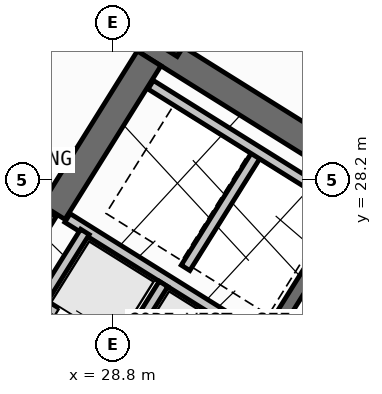
"""IFC4 building model, lengths in metres.
Left out: names, types, materials, properties, quantities, classifications, styles, units other than length and angle.
Written with IfcOpenShell. Run it as: python <this file> out.ifc"""

import sys

from ifc_helpers import new_model, si_unit, direction, frame, frame_2d, origin, origin_2d, place, context, subcontext, project, spatial, rectangle, hollow_rectangle, extrude, source, transform, mapped, element, fill, save


model = new_model("IFC4")
c1 = context("Model", 3, precision=1e-05, world=origin(), true_north=direction((0.0, 1.0)))
c2 = subcontext(c1, "Body", "Model", "MODEL_VIEW")
j1 = project(units=[si_unit("LENGTHUNIT", "METRE"), si_unit("PLANEANGLEUNIT", "RADIAN")], contexts=[c1])
p1 = place(None, origin())
s1 = spatial("IfcSite", under=j1, at=p1, CompositionType="ELEMENT")
p2 = place(p1, origin())
s2 = spatial("IfcBuilding", under=s1, at=p2, CompositionType="ELEMENT")
p3 = place(p2, frame((0.0, 0.0, 112.5)))
s3 = spatial("IfcBuildingStorey", under=s2, at=p3, CompositionType="ELEMENT", Elevation=112.5)
p4 = place(p3, frame((40.573, 24.01, 0.0), z_axis=(0.0, 0.0, 1.0), x_axis=(-0.848047359947, 0.529920442413, 0.0)))
e1 = element("IfcWall", 1, at=p4, inside=s3, PredefinedType="SHEAR", context=c2, shape_type="SweptSolid", body=[
    extrude(rectangle(XDim=13.14, YDim=0.55, at=frame_2d((6.57, 0.0))), origin(), (0.0, 0.0, 1.0), 3.35),
])
p5 = place(p3, frame((29.517, 30.594, 0.0), z_axis=(0.0, 0.0, 1.0), x_axis=(-0.529906864564, -0.848055844204, 0.0)))
e2 = element("IfcWall", 2, at=p5, inside=s3, PredefinedType="SHEAR", context=c2, shape_type="SweptSolid", body=[
    extrude(rectangle(XDim=3.575, YDim=0.55, at=frame_2d((1.788, 0.0))), origin(), (0.0, 0.0, 1.0), 3.35),
])
m1 = source(origin(), c2, "Body", "SweptSolid", [
    extrude(hollow_rectangle(XDim=0.9, YDim=0.9, WallThickness=0.036, at=origin_2d()), origin(), (0.0, 0.0, 1.0), 3.6),
])
p6 = place(p3, frame((29.928, 31.251, 0.0), z_axis=(0.0, 0.0, 1.0), x_axis=(-0.848048096156, 0.529919264233, 0.0)))
e3 = element("IfcColumn", 3, at=p6, inside=s3, PredefinedType="COLUMN", context=c2, shape_type="MappedRepresentation", body=[
    mapped(m1, transform((0.0, 0.0, 0.0), scale=1.0)),
])
p7 = place(p3, frame((31.76, 12.183, 0.0), z_axis=(0.0, 0.0, 1.0), x_axis=(-0.848047074256, 0.529920899612, 0.0)))
e4 = element("IfcWall", 4, at=p7, inside=s3, PredefinedType="STANDARD", context=c2, shape_type="SweptSolid", body=[
    extrude(rectangle(XDim=30.652, YDim=0.32, at=frame_2d((15.326, 0.0))), origin(), (0.0, 0.0, 1.0), 3.35),
])
p8 = place(p7, frame((15.153, 0.0, 0.0)))
e5 = element("IfcOpeningElement", 5, at=p8, cuts=e4, PredefinedType="OPENING", context=c2, shape_type="SweptSolid", body=[
    extrude(rectangle(XDim=1.2, YDim=2.15, at=frame_2d((0.6, 1.075))), frame((0.0, 0.17, 0.0), z_axis=(0.0, -1.0, 0.0), x_axis=(1.0, 0.0, 0.0)), (0.0, 0.0, 1.0), 0.34),
])
p9 = place(p7, frame((2.002, 0.0, 0.8)))
e6 = element("IfcOpeningElement", 6, at=p9, cuts=e4, PredefinedType="OPENING", context=c2, shape_type="SweptSolid", body=[
    extrude(rectangle(XDim=2.1, YDim=1.55, at=frame_2d((1.05, 0.775))), frame((0.0, 0.17, 0.0), z_axis=(0.0, -1.0, 0.0), x_axis=(1.0, 0.0, 0.0)), (0.0, 0.0, 1.0), 0.34),
])
p10 = place(p7, frame((7.206, 0.0, 0.8)))
e7 = element("IfcOpeningElement", 7, at=p10, cuts=e4, PredefinedType="OPENING", context=c2, shape_type="SweptSolid", body=[
    extrude(rectangle(XDim=2.1, YDim=1.55, at=frame_2d((1.05, 0.775))), frame((0.0, 0.17, 0.0), z_axis=(0.0, -1.0, 0.0), x_axis=(1.0, 0.0, 0.0)), (0.0, 0.0, 1.0), 0.34),
])
p11 = place(p7, frame((12.648, 0.0, 1.0)))
e8 = element("IfcOpeningElement", 8, at=p11, cuts=e4, PredefinedType="OPENING", context=c2, shape_type="SweptSolid", body=[
    extrude(rectangle(XDim=0.9, YDim=1.25, at=frame_2d((0.45, 0.625))), frame((0.0, 0.17, 0.0), z_axis=(0.0, -1.0, 0.0), x_axis=(1.0, 0.0, 0.0)), (0.0, 0.0, 1.0), 0.34),
])
p12 = place(p7, frame((19.59, 0.0, 0.95)))
e9 = element("IfcOpeningElement", 9, at=p12, cuts=e4, PredefinedType="OPENING", context=c2, shape_type="SweptSolid", body=[
    extrude(rectangle(XDim=1.2, YDim=1.4, at=frame_2d((0.6, 0.7))), frame((0.0, 0.17, 0.0), z_axis=(0.0, -1.0, 0.0), x_axis=(1.0, 0.0, 0.0)), (0.0, 0.0, 1.0), 0.34),
])
p13 = place(p7, frame((25.966, 0.0, 1.0)))
e10 = element("IfcOpeningElement", 10, at=p13, cuts=e4, PredefinedType="OPENING", context=c2, shape_type="SweptSolid", body=[
    extrude(rectangle(XDim=0.9, YDim=1.25, at=frame_2d((0.45, 0.625))), frame((0.0, 0.17, 0.0), z_axis=(0.0, -1.0, 0.0), x_axis=(1.0, 0.0, 0.0)), (0.0, 0.0, 1.0), 0.34),
])
p14 = place(p7, frame((28.871, 0.0, 1.0)))
e11 = element("IfcOpeningElement", 11, at=p14, cuts=e4, PredefinedType="OPENING", context=c2, shape_type="SweptSolid", body=[
    extrude(rectangle(XDim=0.9, YDim=1.25, at=frame_2d((0.45, 0.625))), frame((0.0, 0.17, 0.0), z_axis=(0.0, -1.0, 0.0), x_axis=(1.0, 0.0, 0.0)), (0.0, 0.0, 1.0), 0.34),
])
p15 = place(p3, frame((33.496, 27.677, 0.0), z_axis=(0.0, 0.0, 1.0), x_axis=(-0.529908658664, -0.84805472316, 0.0)))
e12 = element("IfcWall", 12, at=p15, inside=s3, PredefinedType="SHEAR", context=c2, shape_type="SweptSolid", body=[
    extrude(rectangle(XDim=3.16, YDim=0.26, at=frame_2d((1.58, 0.0))), origin(), (0.0, 0.0, 1.0), 3.35),
])
p16 = place(p3, frame((31.822, 24.998, 0.0), z_axis=(0.0, 0.0, 1.0), x_axis=(-0.848036912365, 0.52993716162, 0.0)))
e13 = element("IfcWall", 13, at=p16, inside=s3, PredefinedType="STANDARD", context=c2, shape_type="SweptSolid", body=[
    extrude(rectangle(XDim=4.618, YDim=0.2, at=frame_2d((2.309, 0.0))), origin(), (0.0, 0.0, 1.0), 3.34),
])
p17 = place(p3, frame((32.108, 22.814, 0.0), z_axis=(0.0, 0.0, 1.0), x_axis=(-0.848042229521, 0.529928652696, 0.0)))
e14 = element("IfcWall", 14, at=p17, inside=s3, PredefinedType="STANDARD", context=c2, shape_type="SweptSolid", body=[
    extrude(rectangle(XDim=5.62, YDim=0.2, at=frame_2d((2.81, 0.0))), origin(), (0.0, 0.0, 1.0), 3.34),
])
p18 = place(p17, frame((0.39, 0.0, 0.0)))
e15 = element("IfcOpeningElement", 15, at=p18, cuts=e14, PredefinedType="OPENING", context=c2, shape_type="SweptSolid", body=[
    extrude(rectangle(XDim=1.1, YDim=2.15, at=frame_2d((0.55, 1.075))), frame((0.0, 0.11, 0.0), z_axis=(0.0, -1.0, 0.0), x_axis=(1.0, 0.0, 0.0)), (0.0, 0.0, 1.0), 0.22),
])
p19 = place(p17, frame((2.25, 0.0, 0.0)))
e16 = element("IfcOpeningElement", 16, at=p19, cuts=e14, PredefinedType="OPENING", context=c2, shape_type="SweptSolid", body=[
    extrude(rectangle(XDim=1.1, YDim=2.15, at=frame_2d((0.55, 1.075))), frame((0.0, 0.11, 0.0), z_axis=(0.0, -1.0, 0.0), x_axis=(1.0, 0.0, 0.0)), (0.0, 0.0, 1.0), 0.22),
])
p20 = place(p17, frame((4.11, 0.0, 0.0)))
e17 = element("IfcOpeningElement", 17, at=p20, cuts=e14, PredefinedType="OPENING", context=c2, shape_type="SweptSolid", body=[
    extrude(rectangle(XDim=1.1, YDim=2.15, at=frame_2d((0.55, 1.075))), frame((0.0, 0.11, 0.0), z_axis=(0.0, -1.0, 0.0), x_axis=(1.0, 0.0, 0.0)), (0.0, 0.0, 1.0), 0.22),
])
p21 = place(p3, frame((28.25, 27.17, 0.0), z_axis=(0.0, 0.0, 1.0), x_axis=(-0.529905827651, -0.848056492117, 0.0)))
e18 = element("IfcWall", 18, at=p21, inside=s3, PredefinedType="STANDARD", context=c2, shape_type="SweptSolid", body=[
    extrude(rectangle(XDim=1.65, YDim=0.2, at=frame_2d((0.825, 0.0))), origin(), (0.0, 0.0, 1.0), 3.34),
])
p22 = place(p3, frame((31.645, 28.716, 0.0), z_axis=(0.0, 0.0, 1.0), x_axis=(-0.52986693015, -0.848080795876, 0.0)))
e19 = element("IfcWall", 19, at=p22, inside=s3, PredefinedType="STANDARD", context=c2, shape_type="SweptSolid", body=[
    extrude(rectangle(XDim=2.66, YDim=0.2, at=frame_2d((1.33, 0.0))), origin(), (0.0, 0.0, 1.0), 3.34),
])
p23 = place(p3, frame((33.363, 27.69, 0.0), z_axis=(0.0, 0.0, 1.0), x_axis=(-0.848047090064, 0.529920874315, 0.0)))
e20 = element("IfcWall", 20, at=p23, inside=s3, PredefinedType="STANDARD", context=c2, shape_type="SweptSolid", body=[
    extrude(rectangle(XDim=4.498, YDim=0.2, at=frame_2d((2.249, 0.0))), origin(), (0.0, 0.0, 1.0), 3.34),
])
p24 = place(p3, frame((29.801, 26.142, 0.0), z_axis=(0.0, 0.0, 1.0), x_axis=(-0.529998940003, -0.847998304005, 0.0)))
e21 = element("IfcWall", 21, at=p24, inside=s3, PredefinedType="STANDARD", context=c2, shape_type="SweptSolid", body=[
    extrude(rectangle(XDim=1.58, YDim=0.2, at=frame_2d((0.79, 0.0))), origin(), (0.0, 0.0, 1.0), 3.34),
])
p25 = place(p3, frame((27.596, 27.52, 0.0), z_axis=(0.0, 0.0, 1.0), x_axis=(-0.529865479138, -0.848081702443, 0.0)))
e22 = element("IfcWall", 22, at=p25, inside=s3, PredefinedType="STANDARD", context=c2, shape_type="SweptSolid", body=[
    extrude(rectangle(XDim=2.96, YDim=0.2, at=frame_2d((1.48, 0.0))), origin(), (0.0, 0.0, 1.0), 3.34),
])
p26 = place(p25, frame((1.76, 0.0, 0.0)))
e23 = element("IfcOpeningElement", 23, at=p26, cuts=e22, PredefinedType="OPENING", context=c2, shape_type="SweptSolid", body=[
    extrude(rectangle(XDim=0.86, YDim=2.05, at=frame_2d((0.43, 1.025))), frame((0.0, 0.11, 0.0), z_axis=(0.0, -1.0, 0.0), x_axis=(1.0, 0.0, 0.0)), (0.0, 0.0, 1.0), 0.22),
])
p27 = place(p3, frame((31.239, 38.274, 0.0), z_axis=(0.0, 0.0, 1.0), x_axis=(-0.529925472745, -0.848044216616, 0.0)))
e24 = element("IfcWall", 24, at=p27, inside=s3, PredefinedType="PARTITIONING", context=c2, shape_type="SweptSolid", body=[
    extrude(rectangle(XDim=11.65, YDim=0.16, at=frame_2d((5.825, 0.0))), origin(), (0.0, 0.0, 1.0), 3.34),
])
p28 = place(p3, frame((41.936, 26.012, 0.0), z_axis=(0.0, 0.0, 1.0), x_axis=(-0.848051154596, 0.529914369676, 0.0)))
e25 = element("IfcWall", 25, at=p28, inside=s3, PredefinedType="PARTITIONING", context=c2, shape_type="SweptSolid", body=[
    extrude(rectangle(XDim=15.57, YDim=0.16, at=frame_2d((7.785, 0.0))), origin(), (0.0, 0.0, 1.0), 3.34),
])
p29 = place(p28, frame((10.83, 0.0, 0.0)))
e26 = element("IfcOpeningElement", 26, at=p29, cuts=e25, PredefinedType="OPENING", context=c2, shape_type="SweptSolid", body=[
    extrude(rectangle(XDim=1.0, YDim=2.1, at=frame_2d((0.5, 1.05))), frame((0.0, 0.09, 0.0), z_axis=(0.0, -1.0, 0.0), x_axis=(1.0, 0.0, 0.0)), (0.0, 0.0, 1.0), 0.18),
])
p30 = place(p3, frame((42.226, 28.873, 0.0), z_axis=(0.0, 0.0, 1.0), x_axis=(-0.848049134363, 0.529917602752, 0.0)))
e27 = element("IfcWall", 27, at=p30, inside=s3, PredefinedType="PLUMBINGWALL", context=c2, shape_type="SweptSolid", body=[
    extrude(rectangle(XDim=14.3, YDim=0.14, at=frame_2d((7.15, 0.0))), origin(), (0.0, 0.0, 1.0), 3.34),
])
p31 = place(p30, frame((9.57, 0.0, 0.0)))
e28 = element("IfcOpeningElement", 28, at=p31, cuts=e27, PredefinedType="OPENING", context=c2, shape_type="SweptSolid", body=[
    extrude(rectangle(XDim=0.92, YDim=2.08, at=frame_2d((0.46, 1.04))), frame((0.0, 0.08, 0.0), z_axis=(0.0, -1.0, 0.0), x_axis=(1.0, 0.0, 0.0)), (0.0, 0.0, 1.0), 0.16),
])
m2 = source(origin(), c2, "Body", "SweptSolid", [
    extrude(rectangle(XDim=1.1, YDim=2.15, at=frame_2d((0.55, 1.075))), frame((0.0, 0.025, 0.0), z_axis=(0.0, -1.0, 0.0), x_axis=(1.0, 0.0, 0.0)), (0.0, 0.0, 1.0), 0.05),
])
p32 = place(p20, origin())
e29 = element("IfcDoor", 29, at=p32, inside=s3, OperationType="DOUBLE_DOOR_SLIDING", PredefinedType="DOOR", context=c2, shape_type="MappedRepresentation", body=[
    mapped(m2, transform((0.0, 0.0, 0.0), scale=1.0)),
])
fill(e17, e29)
save(model, sys.argv[1])
